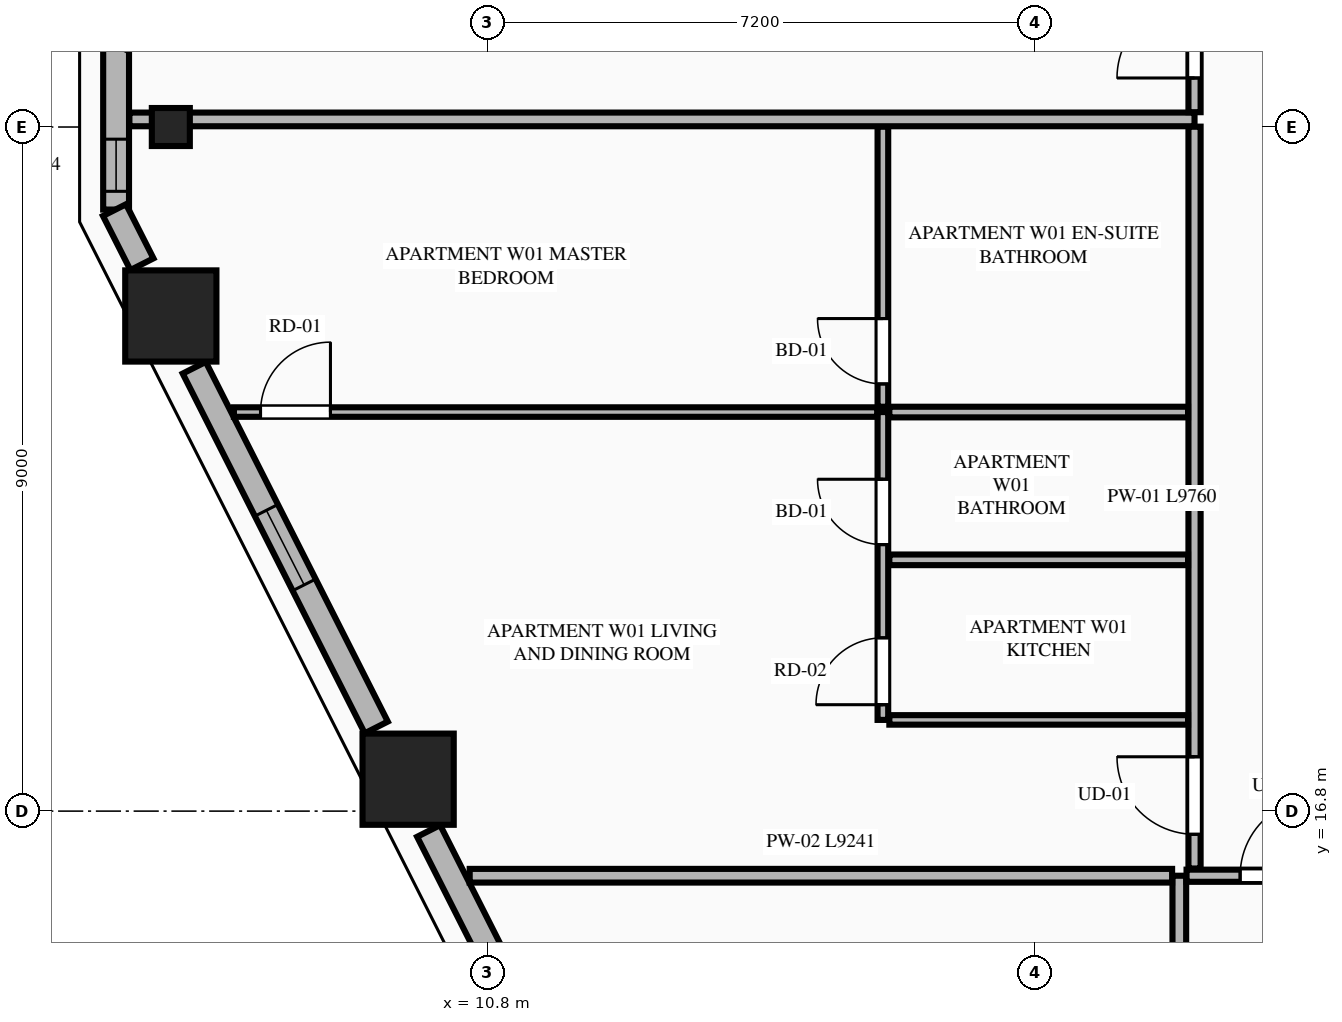
"""IFC4 building model, lengths in metres.
Left out: names, types, materials, properties, quantities, classifications, styles, units other than length and angle.
Written with IfcOpenShell. Run it as: python <this file> out.ifc"""

import sys

from ifc_helpers import new_model, si_unit, direction, frame, frame_2d, origin, origin_2d, place, context, subcontext, project, spatial, rectangle, extrude, element, fill, save


model = new_model("IFC4")
c1 = context("Model", 3, precision=1e-05, world=origin(), true_north=direction((0.0, 1.0)))
c2 = subcontext(c1, "Body", "Model", "MODEL_VIEW")
j1 = project(units=[si_unit("LENGTHUNIT", "METRE"), si_unit("PLANEANGLEUNIT", "RADIAN")], contexts=[c1])
p1 = place(None, origin())
s1 = spatial("IfcSite", under=j1, at=p1, CompositionType="ELEMENT")
p2 = place(p1, origin())
s2 = spatial("IfcBuilding", under=s1, at=p2, CompositionType="ELEMENT")
p3 = place(p2, frame((0.0, 0.0, 28.45)))
s3 = spatial("IfcBuildingStorey", under=s2, at=p3, CompositionType="ELEMENT", Elevation=28.45)
for number, where, z_axis, x_axis in (
    (1, (6.632, 23.314, 0.0), (0.0, 0.0, 1.0), (1.0, 0.0, 0.0)),
    (2, (9.754, 17.22, 0.0), (0.0, 0.0, 1.0), (1.0, 0.0, 0.0)),
):
    element("IfcColumn", number, at=place(p3, frame(where, z_axis=z_axis, x_axis=x_axis)), inside=s3, PredefinedType="COLUMN", context=c2, shape_type="SweptSolid", body=[
        extrude(rectangle(XDim=1.2, YDim=1.2, at=origin_2d()), origin(), (0.0, 0.0, 1.0), 3.55),
    ])
p4 = place(p3, frame((6.632, 25.8, 0.0), z_axis=(0.0, 0.0, 1.0), x_axis=(0.0, -1.0, 0.0)))
e3 = element("IfcColumn", 3, at=p4, inside=s3, PredefinedType="PILASTER", context=c2, shape_type="SweptSolid", body=[
    extrude(rectangle(XDim=0.5, YDim=0.35, at=origin_2d()), origin(), (0.0, 0.0, 1.0), 3.55),
])
p5 = place(p3, frame((5.912, 26.886, 0.0), z_axis=(0.0, 0.0, 1.0), x_axis=(0.0, -1.0, 0.0)))
e4 = element("IfcWall", 4, at=p5, inside=s3, PredefinedType="STANDARD", context=c2, shape_type="SweptSolid", body=[
    extrude(rectangle(XDim=2.172, YDim=0.34, at=frame_2d((1.086, 0.0))), origin(), (0.0, 0.0, 1.0), 3.33),
])
p6 = place(p5, frame((1.246, 0.0, 0.75)))
e5 = element("IfcOpeningElement", 5, at=p6, cuts=e4, PredefinedType="OPENING", context=c2, shape_type="SweptSolid", body=[
    extrude(rectangle(XDim=0.686, YDim=2.0, at=frame_2d((0.343, 1.0))), frame((0.0, 0.18, 0.0), z_axis=(0.0, -1.0, 0.0), x_axis=(1.0, 0.0, 0.0)), (0.0, 0.0, 1.0), 0.36),
])
p7 = place(p3, frame((5.891, 24.707, 0.0), z_axis=(0.0, 0.0, 1.0), x_axis=(0.452101093511, -0.891966704113, 0.0)))
e6 = element("IfcWall", 6, at=p7, inside=s3, PredefinedType="STANDARD", context=c2, shape_type="SweptSolid", body=[
    extrude(rectangle(XDim=0.798, YDim=0.34, at=frame_2d((0.399, 0.0))), origin(), (0.0, 0.0, 1.0), 3.33),
])
p8 = place(p3, frame((6.94, 22.633, 0.0), z_axis=(0.0, 0.0, 1.0), x_axis=(0.451572088722, -0.892234637686, 0.0)))
e7 = element("IfcWall", 7, at=p8, inside=s3, PredefinedType="STANDARD", context=c2, shape_type="SweptSolid", body=[
    extrude(rectangle(XDim=5.304, YDim=0.34, at=frame_2d((2.652, 0.0))), origin(), (0.0, 0.0, 1.0), 2.787),
])
p9 = place(p8, frame((2.102, 0.0, 0.75)))
e8 = element("IfcOpeningElement", 8, at=p9, cuts=e7, PredefinedType="OPENING", context=c2, shape_type="SweptSolid", body=[
    extrude(rectangle(XDim=1.1, YDim=1.887, at=frame_2d((0.55, 0.943))), frame((0.0, 0.18, 0.0), z_axis=(0.0, -1.0, 0.0), x_axis=(1.0, 0.0, 0.0)), (0.0, 0.0, 1.0), 0.36),
])
p10 = place(p3, frame((10.024, 16.539, 0.0), z_axis=(0.0, 0.0, 1.0), x_axis=(0.451627137896, -0.892206774417, 0.0)))
e9 = element("IfcWall", 9, at=p10, inside=s3, PredefinedType="STANDARD", context=c2, shape_type="SweptSolid", body=[
    extrude(rectangle(XDim=5.547, YDim=0.34, at=frame_2d((2.773, 0.0))), origin(), (0.0, 0.0, 1.0), 2.787),
])
p11 = place(p10, frame((2.223, 0.0, 0.75)))
e10 = element("IfcOpeningElement", 10, at=p11, cuts=e9, PredefinedType="OPENING", context=c2, shape_type="SweptSolid", body=[
    extrude(rectangle(XDim=1.1, YDim=1.887, at=frame_2d((0.55, 0.943))), frame((0.0, 0.18, 0.0), z_axis=(0.0, -1.0, 0.0), x_axis=(1.0, 0.0, 0.0)), (0.0, 0.0, 1.0), 0.36),
])
p12 = place(p3, frame((19.9, 2.455, 0.0), z_axis=(0.0, 0.0, 1.0), x_axis=(0.0, 1.0, 0.0)))
e11 = element("IfcWall", 11, at=p12, inside=s3, PredefinedType="PARTITIONING", context=c2, shape_type="SweptSolid", body=[
    extrude(rectangle(XDim=13.495, YDim=0.18, at=frame_2d((6.748, 0.0))), origin(), (0.0, 0.0, 1.0), 3.33),
])
p13 = place(p3, frame((19.995, 15.95, 0.0), z_axis=(0.0, 0.0, 1.0), x_axis=(1.0, 0.0, 0.0)))
e12 = element("IfcWall", 12, at=p13, inside=s3, PredefinedType="PARTITIONING", context=c2, shape_type="SweptSolid", body=[
    extrude(rectangle(XDim=8.188, YDim=0.16, at=frame_2d((4.094, 0.0))), origin(), (0.0, 0.0, 1.0), 3.33),
])
p14 = place(p13, frame((0.705, 0.0, 0.0)))
e13 = element("IfcOpeningElement", 13, at=p14, cuts=e12, PredefinedType="OPENING", context=c2, shape_type="SweptSolid", body=[
    extrude(rectangle(XDim=1.02, YDim=2.25, at=frame_2d((0.51, 1.125))), frame((0.0, 0.09, 0.0), z_axis=(0.0, -1.0, 0.0), x_axis=(1.0, 0.0, 0.0)), (0.0, 0.0, 1.0), 0.18),
])
p15 = place(p3, frame((10.564, 15.95, 0.0), z_axis=(0.0, 0.0, 1.0), x_axis=(1.0, 0.0, 0.0)))
e14 = element("IfcWall", 14, at=p15, inside=s3, PredefinedType="PARTITIONING", context=c2, shape_type="SweptSolid", body=[
    extrude(rectangle(XDim=9.241, YDim=0.18, at=frame_2d((4.621, 0.0))), origin(), (0.0, 0.0, 1.0), 3.33),
])
p16 = place(p3, frame((20.1, 16.045, 0.0), z_axis=(0.0, 0.0, 1.0), x_axis=(0.0, 1.0, 0.0)))
e15 = element("IfcWall", 15, at=p16, inside=s3, PredefinedType="PARTITIONING", context=c2, shape_type="SweptSolid", body=[
    extrude(rectangle(XDim=9.76, YDim=0.16, at=frame_2d((4.88, 0.0))), origin(), (0.0, 0.0, 1.0), 2.7),
])
p17 = place(p16, frame((0.45, 0.0, 0.0)))
e16 = element("IfcOpeningElement", 16, at=p17, cuts=e15, PredefinedType="OPENING", context=c2, shape_type="SweptSolid", body=[
    extrude(rectangle(XDim=1.02, YDim=2.25, at=frame_2d((0.51, 1.125))), frame((0.0, 0.09, 0.0), z_axis=(0.0, -1.0, 0.0), x_axis=(1.0, 0.0, 0.0)), (0.0, 0.0, 1.0), 0.18),
])
p18 = place(p3, frame((16.085, 18.0, 0.0), z_axis=(0.0, 0.0, 1.0), x_axis=(1.0, 0.0, 0.0)))
e17 = element("IfcWall", 17, at=p18, inside=s3, PredefinedType="PARTITIONING", context=c2, shape_type="SweptSolid", body=[
    extrude(rectangle(XDim=3.93, YDim=0.125, at=frame_2d((1.965, 0.0))), origin(), (0.0, 0.0, 1.0), 2.7),
])
p19 = place(p3, frame((16.0, 18.0, 0.0), z_axis=(0.0, 0.0, 1.0), x_axis=(0.0, 1.0, 0.0)))
e18 = element("IfcWall", 18, at=p19, inside=s3, PredefinedType="PLUMBINGWALL", context=c2, shape_type="SweptSolid", body=[
    extrude(rectangle(XDim=4.05, YDim=0.14, at=frame_2d((2.025, 0.0))), origin(), (0.0, 0.0, 1.0), 3.33),
])
p20 = place(p19, frame((0.2, 0.0, 0.0)))
e19 = element("IfcOpeningElement", 19, at=p20, cuts=e18, PredefinedType="OPENING", context=c2, shape_type="SweptSolid", body=[
    extrude(rectangle(XDim=0.88, YDim=2.15, at=frame_2d((0.44, 1.075))), frame((0.0, 0.08, 0.0), z_axis=(0.0, -1.0, 0.0), x_axis=(1.0, 0.0, 0.0)), (0.0, 0.0, 1.0), 0.16),
])
p21 = place(p19, frame((2.306, 0.0, 0.0)))
e20 = element("IfcOpeningElement", 20, at=p21, cuts=e18, PredefinedType="OPENING", context=c2, shape_type="SweptSolid", body=[
    extrude(rectangle(XDim=0.86, YDim=2.1, at=frame_2d((0.43, 1.05))), frame((0.0, 0.08, 0.0), z_axis=(0.0, -1.0, 0.0), x_axis=(1.0, 0.0, 0.0)), (0.0, 0.0, 1.0), 0.16),
])
p22 = place(p3, frame((16.0, 22.12, 0.0), z_axis=(0.0, 0.0, 1.0), x_axis=(0.0, 1.0, 0.0)))
e21 = element("IfcWall", 21, at=p22, inside=s3, PredefinedType="PLUMBINGWALL", context=c2, shape_type="SweptSolid", body=[
    extrude(rectangle(XDim=3.685, YDim=0.14, at=frame_2d((1.842, 0.0))), origin(), (0.0, 0.0, 1.0), 3.33),
])
p23 = place(p22, frame((0.3, 0.0, 0.0)))
e22 = element("IfcOpeningElement", 22, at=p23, cuts=e21, PredefinedType="OPENING", context=c2, shape_type="SweptSolid", body=[
    extrude(rectangle(XDim=0.86, YDim=2.1, at=frame_2d((0.43, 1.05))), frame((0.0, 0.08, 0.0), z_axis=(0.0, -1.0, 0.0), x_axis=(1.0, 0.0, 0.0)), (0.0, 0.0, 1.0), 0.16),
])
p24 = place(p3, frame((16.085, 22.05, 0.0), z_axis=(0.0, 0.0, 1.0), x_axis=(1.0, 0.0, 0.0)))
e23 = element("IfcWall", 23, at=p24, inside=s3, PredefinedType="PLUMBINGWALL", context=c2, shape_type="SweptSolid", body=[
    extrude(rectangle(XDim=3.93, YDim=0.14, at=frame_2d((1.965, 0.0))), origin(), (0.0, 0.0, 1.0), 3.33),
])
p25 = place(p3, frame((7.462, 22.05, 0.0), z_axis=(0.0, 0.0, 1.0), x_axis=(1.0, 0.0, 0.0)))
e24 = element("IfcWall", 24, at=p25, inside=s3, PredefinedType="PARTITIONING", context=c2, shape_type="SweptSolid", body=[
    extrude(rectangle(XDim=8.463, YDim=0.125, at=frame_2d((4.231, 0.0))), origin(), (0.0, 0.0, 1.0), 3.33),
])
p26 = place(p25, frame((0.35, 0.0, 0.0)))
e25 = element("IfcOpeningElement", 25, at=p26, cuts=e24, PredefinedType="OPENING", context=c2, shape_type="SweptSolid", body=[
    extrude(rectangle(XDim=0.92, YDim=2.15, at=frame_2d((0.46, 1.075))), frame((0.0, 0.073, 0.0), z_axis=(0.0, -1.0, 0.0), x_axis=(1.0, 0.0, 0.0)), (0.0, 0.0, 1.0), 0.145),
])
p27 = place(p3, frame((16.085, 20.106, 0.0), z_axis=(0.0, 0.0, 1.0), x_axis=(1.0, 0.0, 0.0)))
e26 = element("IfcWall", 26, at=p27, inside=s3, PredefinedType="PLUMBINGWALL", context=c2, shape_type="SweptSolid", body=[
    extrude(rectangle(XDim=3.93, YDim=0.14, at=frame_2d((1.965, 0.0))), origin(), (0.0, 0.0, 1.0), 3.33),
])
p28 = place(p3, frame((6.087, 25.9, 0.0), z_axis=(0.0, 0.0, 1.0), x_axis=(1.0, 0.0, 0.0)))
e27 = element("IfcWall", 27, at=p28, inside=s3, PredefinedType="PARTITIONING", context=c2, shape_type="SweptSolid", body=[
    extrude(rectangle(XDim=14.013, YDim=0.18, at=frame_2d((7.007, 0.0))), origin(), (0.0, 0.0, 1.0), 3.33),
])
p29 = place(p3, frame((20.1, 25.995, 0.0), z_axis=(0.0, 0.0, 1.0), x_axis=(0.0, 1.0, 0.0)))
e28 = element("IfcWall", 28, at=p29, inside=s3, PredefinedType="PARTITIONING", context=c2, shape_type="SweptSolid", body=[
    extrude(rectangle(XDim=9.76, YDim=0.16, at=frame_2d((4.88, 0.0))), origin(), (0.0, 0.0, 1.0), 2.7),
])
p30 = place(p29, frame((0.45, 0.0, 0.0)))
e29 = element("IfcOpeningElement", 29, at=p30, cuts=e28, PredefinedType="OPENING", context=c2, shape_type="SweptSolid", body=[
    extrude(rectangle(XDim=1.02, YDim=2.25, at=frame_2d((0.51, 1.125))), frame((0.0, 0.09, 0.0), z_axis=(0.0, -1.0, 0.0), x_axis=(1.0, 0.0, 0.0)), (0.0, 0.0, 1.0), 0.18),
])
p31 = place(p9, origin())
e30 = element("IfcWindow", 30, at=p31, inside=s3, PartitioningType="SINGLE_PANEL", PredefinedType="WINDOW", context=c2, shape_type="SweptSolid", body=[
    extrude(rectangle(XDim=1.1, YDim=1.887, at=frame_2d((0.55, 0.943))), frame((0.0, 0.03, 0.0), z_axis=(0.0, -1.0, 0.0), x_axis=(1.0, 0.0, 0.0)), (0.0, 0.0, 1.0), 0.06),
])
fill(e8, e30)
p32 = place(p14, origin())
e31 = element("IfcDoor", 31, at=p32, inside=s3, OperationType="SINGLE_SWING_RIGHT", PredefinedType="DOOR", context=c2, shape_type="SweptSolid", body=[
    extrude(rectangle(XDim=1.02, YDim=2.25, at=frame_2d((0.51, 1.125))), frame((0.0, 0.025, 0.0), z_axis=(0.0, -1.0, 0.0), x_axis=(1.0, 0.0, 0.0)), (0.0, 0.0, 1.0), 0.05),
])
fill(e13, e31)
p33 = place(p20, origin())
e32 = element("IfcDoor", 32, at=p33, inside=s3, OperationType="SINGLE_SWING_LEFT", PredefinedType="DOOR", context=c2, shape_type="SweptSolid", body=[
    extrude(rectangle(XDim=0.88, YDim=2.15, at=frame_2d((0.44, 1.075))), frame((0.0, 0.025, 0.0), z_axis=(0.0, -1.0, 0.0), x_axis=(1.0, 0.0, 0.0)), (0.0, 0.0, 1.0), 0.05),
])
fill(e19, e32)
p34 = place(p21, origin())
e33 = element("IfcDoor", 33, at=p34, inside=s3, OperationType="SINGLE_SWING_RIGHT", PredefinedType="DOOR", context=c2, shape_type="SweptSolid", body=[
    extrude(rectangle(XDim=0.86, YDim=2.1, at=frame_2d((0.43, 1.05))), frame((0.0, 0.025, 0.0), z_axis=(0.0, -1.0, 0.0), x_axis=(1.0, 0.0, 0.0)), (0.0, 0.0, 1.0), 0.05),
])
fill(e20, e33)
p35 = place(p23, origin())
e34 = element("IfcDoor", 34, at=p35, inside=s3, OperationType="SINGLE_SWING_RIGHT", PredefinedType="DOOR", context=c2, shape_type="SweptSolid", body=[
    extrude(rectangle(XDim=0.86, YDim=2.1, at=frame_2d((0.43, 1.05))), frame((0.0, 0.025, 0.0), z_axis=(0.0, -1.0, 0.0), x_axis=(1.0, 0.0, 0.0)), (0.0, 0.0, 1.0), 0.05),
])
fill(e22, e34)
p36 = place(p17, origin())
e35 = element("IfcDoor", 35, at=p36, inside=s3, OperationType="SINGLE_SWING_RIGHT", PredefinedType="DOOR", context=c2, shape_type="SweptSolid", body=[
    extrude(rectangle(XDim=1.02, YDim=2.25, at=frame_2d((0.51, 1.125))), frame((0.0, 0.025, 0.0), z_axis=(0.0, -1.0, 0.0), x_axis=(1.0, 0.0, 0.0)), (0.0, 0.0, 1.0), 0.05),
])
fill(e16, e35)
p37 = place(p26, origin())
e36 = element("IfcDoor", 36, at=p37, inside=s3, OperationType="SINGLE_SWING_RIGHT", PredefinedType="DOOR", context=c2, shape_type="SweptSolid", body=[
    extrude(rectangle(XDim=0.92, YDim=2.15, at=frame_2d((0.46, 1.075))), frame((0.0, 0.025, 0.0), z_axis=(0.0, -1.0, 0.0), x_axis=(1.0, 0.0, 0.0)), (0.0, 0.0, 1.0), 0.05),
])
fill(e25, e36)
p38 = place(p30, origin())
e37 = element("IfcDoor", 37, at=p38, inside=s3, OperationType="SINGLE_SWING_LEFT", PredefinedType="DOOR", context=c2, shape_type="SweptSolid", body=[
    extrude(rectangle(XDim=1.02, YDim=2.25, at=frame_2d((0.51, 1.125))), frame((0.0, 0.025, 0.0), z_axis=(0.0, -1.0, 0.0), x_axis=(1.0, 0.0, 0.0)), (0.0, 0.0, 1.0), 0.05),
])
fill(e29, e37)
p39 = place(p6, origin())
e38 = element("IfcWindow", 38, at=p39, inside=s3, PartitioningType="SINGLE_PANEL", PredefinedType="WINDOW", context=c2, shape_type="SweptSolid", body=[
    extrude(rectangle(XDim=0.686, YDim=2.0, at=frame_2d((0.343, 1.0))), frame((0.0, 0.03, 0.0), z_axis=(0.0, -1.0, 0.0), x_axis=(1.0, 0.0, 0.0)), (0.0, 0.0, 1.0), 0.06),
])
fill(e5, e38)
save(model, sys.argv[1])
